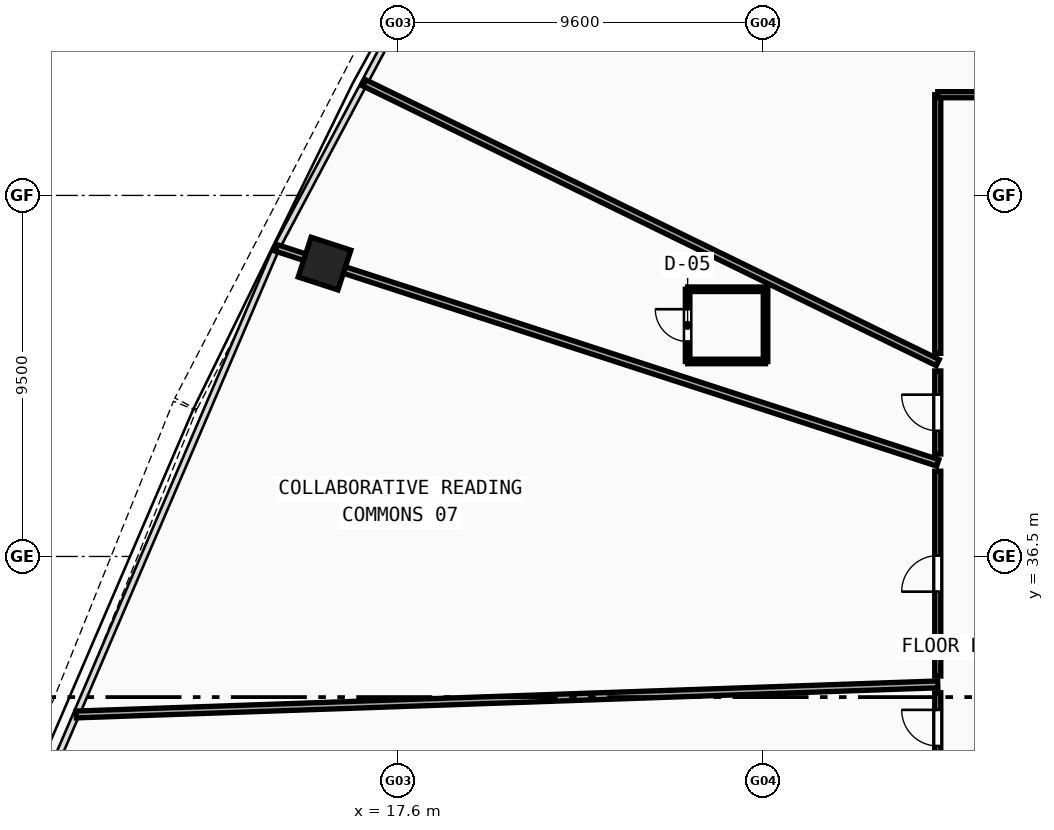
"""IFC4 building model, lengths in metres.
Left out: names, types, materials, properties, quantities, classifications, styles, units other than length and angle.
Written with IfcOpenShell. Run it as: python <this file> out.ifc"""

import sys

from ifc_helpers import new_model, si_unit, direction, frame, frame_2d, origin, origin_with_axes, origin_2d, place, context, subcontext, project, spatial, rectangle, hollow_rectangle, extrude, source, transform, mapped, element, fill, save


model = new_model("IFC4")
c1 = context("Model", 3, precision=1e-05, world=origin(), true_north=direction((0.0, 1.0)))
c2 = subcontext(c1, "Body", "Model", "MODEL_VIEW")
j1 = project(units=[si_unit("LENGTHUNIT", "METRE"), si_unit("PLANEANGLEUNIT", "RADIAN")], contexts=[c1])
p1 = place(None, origin())
s1 = spatial("IfcSite", under=j1, at=p1, CompositionType="ELEMENT")
p2 = place(p1, origin())
s2 = spatial("IfcBuilding", under=s1, at=p2, CompositionType="ELEMENT")
p3 = place(p2, frame((0.0, 0.0, 55.81)))
s3 = spatial("IfcBuildingStorey", under=s2, at=p3, CompositionType="ELEMENT", Elevation=55.81)
m1 = source(origin(), c2, "Body", "SweptSolid", [
    extrude(hollow_rectangle(XDim=1.1, YDim=1.1, WallThickness=0.045, at=origin_2d()), origin(), (0.0, 0.0, 1.0), 3.63),
])
p4 = place(p3, frame((15.665, 44.206, -0.26), z_axis=(0.0, 0.0, 1.0), x_axis=(-0.309016994375, -0.951056516295, 0.0)))
e1 = element("IfcColumn", 1, at=p4, inside=s3, PredefinedType="COLUMN", context=c2, shape_type="MappedRepresentation", body=[
    mapped(m1, transform((0.0, 0.0, 0.0), scale=1.0)),
])
p5 = place(p3, frame((41.344, 48.65, 0.0), z_axis=(0.0, 0.0, 1.0), x_axis=(-0.406729800422, 0.913548504158, 0.0)))
e2 = element("IfcWall", 2, at=p5, inside=s3, PredefinedType="PARTITIONING", context=c2, shape_type="SweptSolid", body=[
    extrude(rectangle(XDim=25.854, YDim=0.18, at=frame_2d((12.927, 0.0))), origin(), (0.0, 0.0, 1.0), 2.67),
])
p6 = place(p3, frame((31.8, 41.601, 0.0), z_axis=(0.0, 0.0, 1.0), x_axis=(-0.898795978277, 0.438367185625, 0.0)))
e3 = element("IfcWall", 3, at=p6, inside=s3, PredefinedType="PARTITIONING", context=c2, shape_type="SweptSolid", body=[
    extrude(rectangle(XDim=16.788, YDim=0.18, at=frame_2d((8.394, 0.0))), origin(), (0.0, 0.0, 1.0), 2.67),
])
p7 = place(p3, frame((31.8, 38.964, 0.0), z_axis=(0.0, 0.0, 1.0), x_axis=(-0.951052304058, 0.309029958006, 0.0)))
e4 = element("IfcWall", 4, at=p7, inside=s3, PredefinedType="PARTITIONING", context=c2, shape_type="SweptSolid", body=[
    extrude(rectangle(XDim=18.299, YDim=0.18, at=frame_2d((9.149, 0.0))), origin(), (0.0, 0.0, 1.0), 2.67),
])
p8 = place(p3, frame((31.8, 33.134, 0.0), z_axis=(0.0, 0.0, 1.0), x_axis=(-0.999390651746, -0.034904515515, 0.0)))
e5 = element("IfcWall", 5, at=p8, inside=s3, PredefinedType="PARTITIONING", context=c2, shape_type="SweptSolid", body=[
    extrude(rectangle(XDim=22.683, YDim=0.18, at=frame_2d((11.342, 0.0))), origin(), (0.0, 0.0, 1.0), 2.67),
])
p9 = place(p3, frame((31.8, 31.063, 0.0), z_axis=(0.0, 0.0, 1.0), x_axis=(0.0, 1.0, 0.0)))
e6 = element("IfcWall", 6, at=p9, inside=s3, PredefinedType="PARTITIONING", context=c2, shape_type="SweptSolid", body=[
    extrude(rectangle(XDim=1.851, YDim=0.16, at=frame_2d((0.926, 0.0))), origin(), (0.0, 0.0, 1.0), 3.37),
])
p10 = place(p9, frame((0.451, 0.0, 0.0)))
e7 = element("IfcOpeningElement", 7, at=p10, cuts=e6, PredefinedType="OPENING", context=c2, shape_type="SweptSolid", body=[
    extrude(rectangle(XDim=0.95, YDim=2.1, at=frame_2d((0.475, 1.05))), frame((0.0, 0.09, 0.0), z_axis=(0.0, -1.0, 0.0), x_axis=(1.0, 0.0, 0.0)), (0.0, 0.0, 1.0), 0.18),
])
p11 = place(p3, frame((31.8, 33.354, 0.0), z_axis=(0.0, 0.0, 1.0), x_axis=(0.0, 1.0, 0.0)))
e8 = element("IfcWall", 8, at=p11, inside=s3, PredefinedType="PARTITIONING", context=c2, shape_type="SweptSolid", body=[
    extrude(rectangle(XDim=5.39, YDim=0.16, at=frame_2d((2.695, 0.0))), origin(), (0.0, 0.0, 1.0), 3.37),
])
p12 = place(p11, frame((2.22, 0.0, 0.0)))
e9 = element("IfcOpeningElement", 9, at=p12, cuts=e8, PredefinedType="OPENING", context=c2, shape_type="SweptSolid", body=[
    extrude(rectangle(XDim=0.95, YDim=2.1, at=frame_2d((0.475, 1.05))), frame((0.0, 0.09, 0.0), z_axis=(0.0, -1.0, 0.0), x_axis=(1.0, 0.0, 0.0)), (0.0, 0.0, 1.0), 0.18),
])
p13 = place(p3, frame((31.8, 39.195, 0.0), z_axis=(0.0, 0.0, 1.0), x_axis=(0.0, 1.0, 0.0)))
e10 = element("IfcWall", 10, at=p13, inside=s3, PredefinedType="PARTITIONING", context=c2, shape_type="SweptSolid", body=[
    extrude(rectangle(XDim=2.187, YDim=0.16, at=frame_2d((1.093, 0.0))), origin(), (0.0, 0.0, 1.0), 3.37),
])
p14 = place(p13, frame((0.613, 0.0, 0.0)))
e11 = element("IfcOpeningElement", 11, at=p14, cuts=e10, PredefinedType="OPENING", context=c2, shape_type="SweptSolid", body=[
    extrude(rectangle(XDim=0.95, YDim=2.1, at=frame_2d((0.475, 1.05))), frame((0.0, 0.09, 0.0), z_axis=(0.0, -1.0, 0.0), x_axis=(1.0, 0.0, 0.0)), (0.0, 0.0, 1.0), 0.18),
])
p15 = place(p3, frame((31.8, 41.846, 0.0), z_axis=(0.0, 0.0, 1.0), x_axis=(0.0, 1.0, 0.0)))
e12 = element("IfcWall", 12, at=p15, inside=s3, PredefinedType="PARTITIONING", context=c2, shape_type="SweptSolid", body=[
    extrude(rectangle(XDim=6.804, YDim=0.16, at=frame_2d((3.402, 0.0))), origin(), (0.0, 0.0, 1.0), 2.67),
])
p16 = place(p3, frame((31.8, 48.65, 0.0), z_axis=(0.0, 0.0, 1.0), x_axis=(1.0, 0.0, 0.0)))
e13 = element("IfcWall", 13, at=p16, inside=s3, PredefinedType="PARTITIONING", context=c2, shape_type="SweptSolid", body=[
    extrude(rectangle(XDim=9.303, YDim=0.16, at=frame_2d((4.651, 0.0))), origin(), (0.0, 0.0, 1.0), 2.97),
])
p17 = place(p16, frame((4.067, 0.0, 0.0)))
e14 = element("IfcOpeningElement", 14, at=p17, cuts=e13, PredefinedType="OPENING", context=c2, shape_type="SweptSolid", body=[
    extrude(rectangle(XDim=0.95, YDim=2.1, at=frame_2d((0.475, 1.05))), frame((0.0, 0.09, 0.0), z_axis=(0.0, -1.0, 0.0), x_axis=(1.0, 0.0, 0.0)), (0.0, 0.0, 1.0), 0.18),
])
p18 = place(p3, frame((25.218, 41.631, 0.0), z_axis=(0.0, 0.0, 1.0), x_axis=(1.0, 0.0, 0.0)))
e15 = element("IfcWall", 15, at=p18, inside=s3, PredefinedType="PARTITIONING", context=c2, shape_type="SweptSolid", body=[
    extrude(rectangle(XDim=2.05, YDim=0.12, at=frame_2d((1.025, 0.0))), origin(), (0.0, 0.0, 1.0), 3.37),
])
p19 = place(p3, frame((27.268, 41.631, 0.0), z_axis=(0.0, 0.0, 1.0), x_axis=(0.0, 1.0, 0.0)))
e16 = element("IfcWall", 16, at=p19, inside=s3, PredefinedType="PARTITIONING", context=c2, shape_type="SweptSolid", body=[
    extrude(rectangle(XDim=1.9, YDim=0.12, at=frame_2d((0.95, 0.0))), origin(), (0.0, 0.0, 1.0), 3.37),
])
p20 = place(p3, frame((27.268, 43.531, 0.0), z_axis=(0.0, 0.0, 1.0), x_axis=(-1.0, 0.0, 0.0)))
e17 = element("IfcWall", 17, at=p20, inside=s3, PredefinedType="PARTITIONING", context=c2, shape_type="SweptSolid", body=[
    extrude(rectangle(XDim=2.05, YDim=0.12, at=frame_2d((1.025, 0.0))), origin(), (0.0, 0.0, 1.0), 3.37),
])
p21 = place(p3, frame((25.218, 43.531, 0.0), z_axis=(0.0, 0.0, 1.0), x_axis=(0.0, -1.0, 0.0)))
e18 = element("IfcWall", 18, at=p21, inside=s3, PredefinedType="PARTITIONING", context=c2, shape_type="SweptSolid", body=[
    extrude(rectangle(XDim=1.9, YDim=0.12, at=frame_2d((0.95, 0.0))), origin(), (0.0, 0.0, 1.0), 3.37),
])
p22 = place(p21, frame((0.525, 0.0, 0.0)))
e19 = element("IfcOpeningElement", 19, at=p22, cuts=e18, PredefinedType="OPENING", context=c2, shape_type="SweptSolid", body=[
    extrude(rectangle(XDim=0.85, YDim=2.1, at=frame_2d((0.425, 1.05))), frame((0.0, 0.07, 0.0), z_axis=(0.0, -1.0, 0.0), x_axis=(1.0, 0.0, 0.0)), (0.0, 0.0, 1.0), 0.14),
])
m2 = source(origin(), c2, "Body", "SweptSolid", [
    extrude(rectangle(XDim=0.95, YDim=2.1, at=frame_2d((0.475, 1.05))), frame((0.0, 0.025, 0.0), z_axis=(0.0, -1.0, 0.0), x_axis=(1.0, 0.0, 0.0)), (0.0, 0.0, 1.0), 0.05),
])
p23 = place(p14, origin_with_axes())
e20 = element("IfcDoor", 20, at=p23, inside=s3, OperationType="SINGLE_SWING_RIGHT", PredefinedType="DOOR", context=c2, shape_type="MappedRepresentation", body=[
    mapped(m2, transform((0.0, 0.0, 0.0), scale=1.0)),
])
fill(e11, e20)
m3 = source(origin(), c2, "Body", "SweptSolid", [
    extrude(rectangle(XDim=0.85, YDim=2.1, at=frame_2d((0.425, 1.05))), frame((0.0, 0.025, 0.0), z_axis=(0.0, -1.0, 0.0), x_axis=(1.0, 0.0, 0.0)), (0.0, 0.0, 1.0), 0.05),
])
p24 = place(p22, frame((0.85, 0.0, 0.0), z_axis=(0.0, 0.0, 1.0), x_axis=(-1.0, 0.0, 0.0)))
e21 = element("IfcDoor", 21, at=p24, inside=s3, OperationType="SINGLE_SWING_RIGHT", PredefinedType="DOOR", context=c2, shape_type="MappedRepresentation", body=[
    mapped(m3, transform((0.0, 0.0, 0.0), scale=1.0)),
])
fill(e19, e21)
p25 = place(p12, origin_with_axes())
e22 = element("IfcDoor", 22, at=p25, inside=s3, OperationType="SINGLE_SWING_LEFT", PredefinedType="DOOR", context=c2, shape_type="MappedRepresentation", body=[
    mapped(m2, transform((0.0, 0.0, 0.0), scale=1.0)),
])
fill(e9, e22)
p26 = place(p10, origin_with_axes())
e23 = element("IfcDoor", 23, at=p26, inside=s3, OperationType="SINGLE_SWING_RIGHT", PredefinedType="DOOR", context=c2, shape_type="MappedRepresentation", body=[
    mapped(m2, transform((0.0, 0.0, 0.0), scale=1.0)),
])
fill(e7, e23)
save(model, sys.argv[1])
